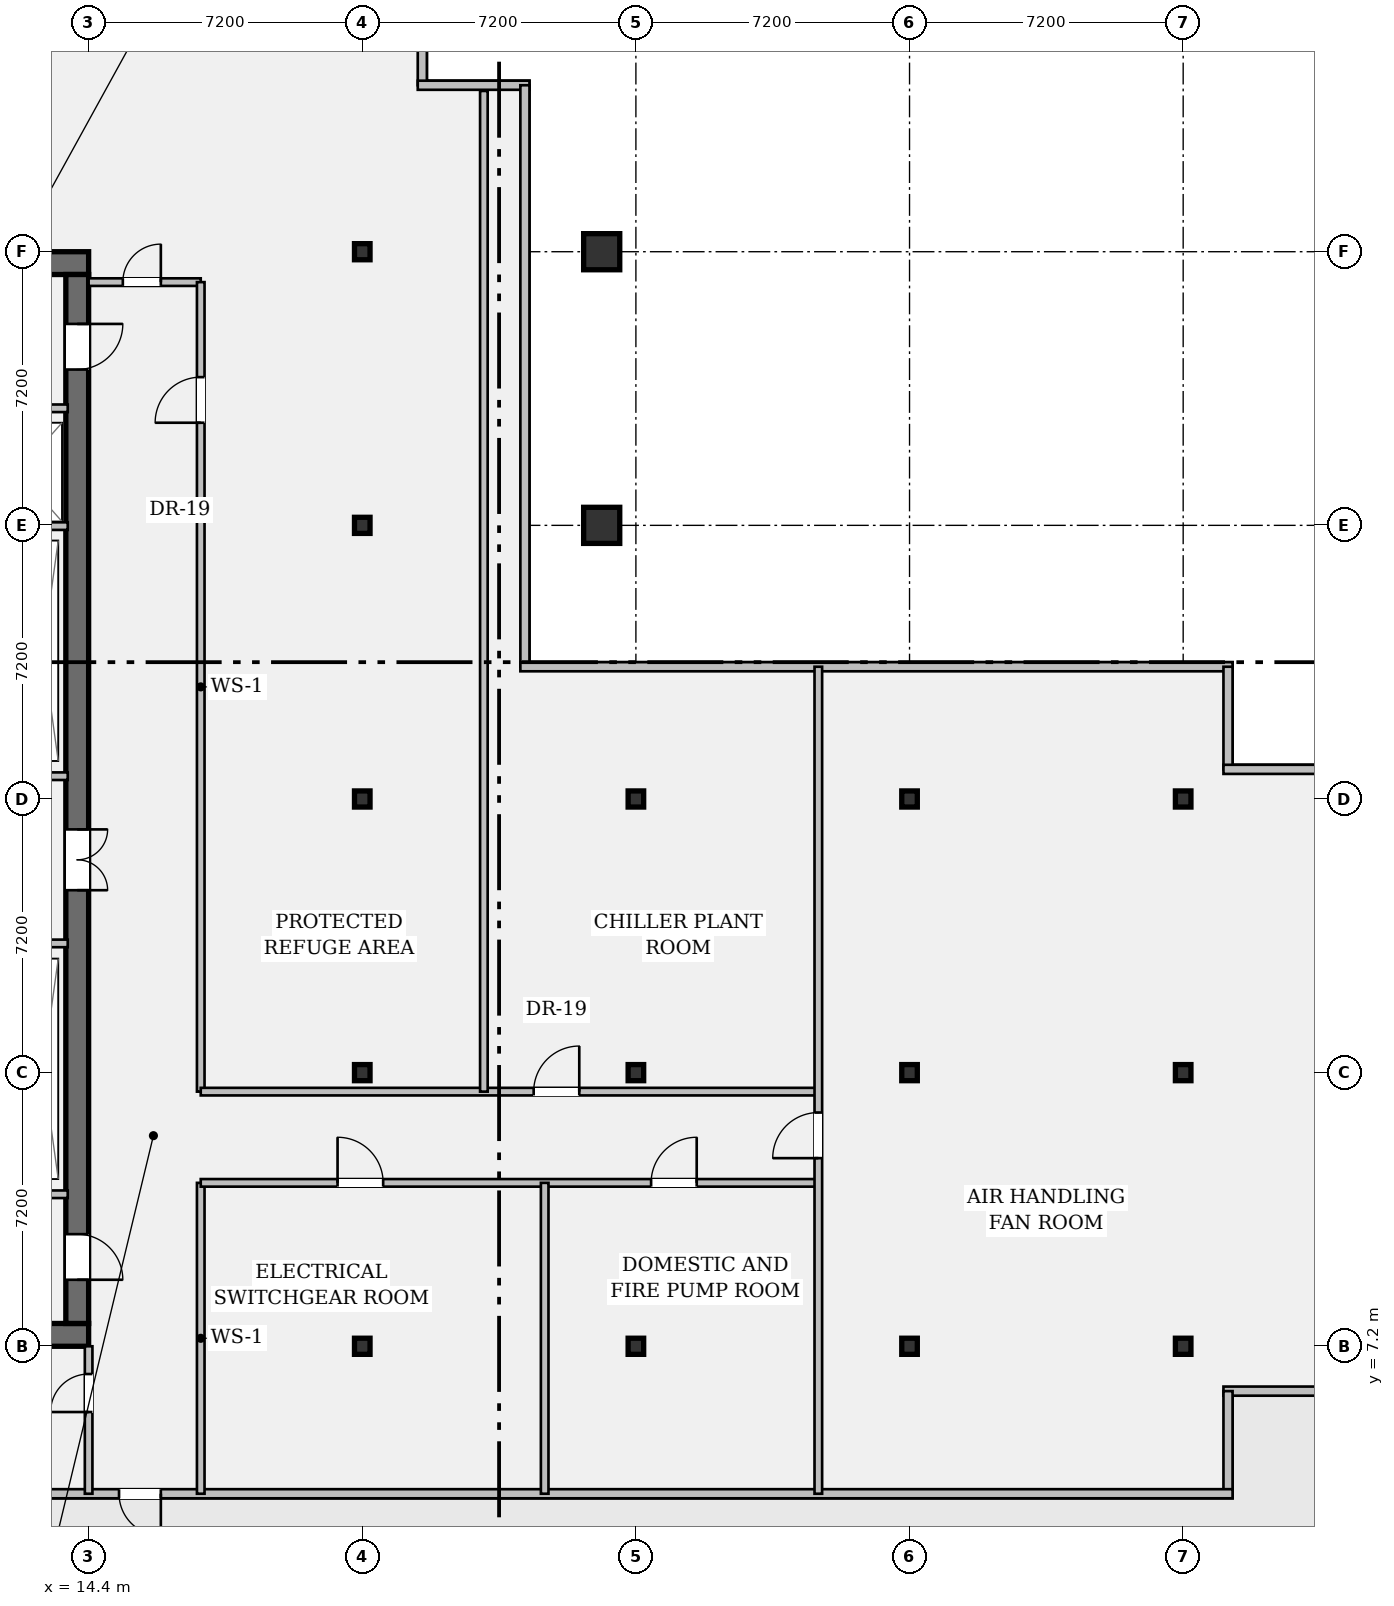
"""IFC4 building model, lengths in metres.
Left out: names, types, materials, properties, quantities, classifications, styles, units other than length and angle.
Written with IfcOpenShell. Run it as: python <this file> out.ifc"""

import sys

from ifc_helpers import new_model, si_unit, direction, frame, frame_2d, origin, origin_2d, place, context, subcontext, project, spatial, rectangle, hollow_rectangle, i_section, extrude, element, fill, save


model = new_model("IFC4")
c1 = context("Model", 3, precision=1e-05, world=origin(), true_north=direction((0.0, 1.0)))
c2 = subcontext(c1, "Body", "Model", "MODEL_VIEW")
j1 = project(units=[si_unit("LENGTHUNIT", "METRE"), si_unit("PLANEANGLEUNIT", "RADIAN")], contexts=[c1])
p1 = place(None, origin())
s1 = spatial("IfcSite", under=j1, at=p1, CompositionType="ELEMENT")
p2 = place(p1, origin())
s2 = spatial("IfcBuilding", under=s1, at=p2, CompositionType="ELEMENT")
p3 = place(p2, frame((0.0, 0.0, 92.75)))
s3 = spatial("IfcBuildingStorey", under=s2, at=p3, CompositionType="ELEMENT", Elevation=92.75)
for number, where, z_axis, x_axis in (
    (1, (0.6, 7.5, 0.0), (0.0, 0.0, 1.0), (1.0, 0.0, 0.0)),
    (2, (0.6, 35.7, 0.0), (0.0, 0.0, 1.0), (1.0, 0.0, 0.0)),
):
    element("IfcWall", number, at=place(p3, frame(where, z_axis=z_axis, x_axis=x_axis)), inside=s3, PredefinedType="SHEAR", context=c2, shape_type="SweptSolid", body=[
        extrude(rectangle(XDim=13.8, YDim=0.6, at=frame_2d((6.9, 0.0))), origin(), (0.0, 0.0, 1.0), 4.6),
    ])
p4 = place(p3, frame((14.1, 35.4, 0.0), z_axis=(0.0, 0.0, 1.0), x_axis=(0.0, -1.0, 0.0)))
e3 = element("IfcWall", 3, at=p4, inside=s3, PredefinedType="SHEAR", context=c2, shape_type="SweptSolid", body=[
    extrude(rectangle(XDim=27.6, YDim=0.6, at=frame_2d((13.8, 0.0))), origin(), (0.0, 0.0, 1.0), 4.6),
])
p5 = place(p4, frame((1.3, 0.0, 0.0)))
e4 = element("IfcOpeningElement", 4, at=p5, cuts=e3, PredefinedType="OPENING", context=c2, shape_type="SweptSolid", body=[
    extrude(rectangle(XDim=1.2, YDim=2.15, at=frame_2d((0.6, 1.075))), frame((0.0, 0.312, 0.0), z_axis=(0.0, -1.0, 0.0), x_axis=(1.0, 0.0, 0.0)), (0.0, 0.0, 1.0), 0.624),
])
p6 = place(p4, frame((25.25, 0.0, 0.0)))
e5 = element("IfcOpeningElement", 5, at=p6, cuts=e3, PredefinedType="OPENING", context=c2, shape_type="SweptSolid", body=[
    extrude(rectangle(XDim=1.2, YDim=2.15, at=frame_2d((0.6, 1.075))), frame((0.0, 0.312, 0.0), z_axis=(0.0, -1.0, 0.0), x_axis=(1.0, 0.0, 0.0)), (0.0, 0.0, 1.0), 0.624),
])
p7 = place(p4, frame((14.6, 0.0, 0.0)))
e6 = element("IfcOpeningElement", 6, at=p7, cuts=e3, PredefinedType="OPENING", context=c2, shape_type="SweptSolid", body=[
    extrude(rectangle(XDim=1.6, YDim=2.2, at=frame_2d((0.8, 1.1))), frame((0.0, 0.312, 0.0), z_axis=(0.0, -1.0, 0.0), x_axis=(1.0, 0.0, 0.0)), (0.0, 0.0, 1.0), 0.624),
])
for number, where, z_axis, x_axis in (
    (7, (21.6, 7.2, 0.0), (0.0, 0.0, 1.0), (1.0, 0.0, 0.0)),
    (8, (21.6, 14.4, 0.0), (0.0, 0.0, 1.0), (1.0, 0.0, 0.0)),
    (9, (21.6, 21.6, 0.0), (0.0, 0.0, 1.0), (1.0, 0.0, 0.0)),
    (10, (21.6, 28.8, 0.0), (0.0, 0.0, 1.0), (1.0, 0.0, 0.0)),
    (11, (21.6, 36.0, 0.0), (0.0, 0.0, 1.0), (1.0, 0.0, 0.0)),
):
    element("IfcColumn", number, at=place(p3, frame(where, z_axis=z_axis, x_axis=x_axis)), inside=s3, PredefinedType="COLUMN", context=c2, shape_type="SweptSolid", body=[
        extrude(i_section(OverallWidth=0.409, OverallDepth=0.424, WebThickness=0.033, FlangeThickness=0.052, FilletRadius=0.018, at=origin_2d()), origin(), (0.0, 0.0, 1.0), 4.6),
    ])
for number, where, z_axis, x_axis in (
    (12, (27.9, 28.8, 0.0), (0.0, 0.0, 1.0), (1.0, 0.0, 0.0)),
    (13, (27.9, 36.0, 0.0), (0.0, 0.0, 1.0), (1.0, 0.0, 0.0)),
):
    element("IfcColumn", number, at=place(p3, frame(where, z_axis=z_axis, x_axis=x_axis)), inside=s3, PredefinedType="COLUMN", context=c2, shape_type="SweptSolid", body=[
        extrude(hollow_rectangle(XDim=0.95, YDim=0.95, WallThickness=0.06, at=origin_2d()), origin(), (0.0, 0.0, 1.0), 4.6),
    ])
for number, where, z_axis, x_axis in (
    (14, (28.8, 7.2, 0.0), (0.0, 0.0, 1.0), (1.0, 0.0, 0.0)),
    (15, (28.8, 14.4, 0.0), (0.0, 0.0, 1.0), (1.0, 0.0, 0.0)),
    (16, (28.8, 21.6, 0.0), (0.0, 0.0, 1.0), (1.0, 0.0, 0.0)),
    (17, (36.0, 7.2, 0.0), (0.0, 0.0, 1.0), (1.0, 0.0, 0.0)),
    (18, (36.0, 14.4, 0.0), (0.0, 0.0, 1.0), (1.0, 0.0, 0.0)),
    (19, (36.0, 21.6, 0.0), (0.0, 0.0, 1.0), (1.0, 0.0, 0.0)),
    (20, (43.2, 7.2, 0.0), (0.0, 0.0, 1.0), (1.0, 0.0, 0.0)),
    (21, (43.2, 14.4, 0.0), (0.0, 0.0, 1.0), (1.0, 0.0, 0.0)),
    (22, (43.2, 21.6, 0.0), (0.0, 0.0, 1.0), (1.0, 0.0, 0.0)),
):
    element("IfcColumn", number, at=place(p3, frame(where, z_axis=z_axis, x_axis=x_axis)), inside=s3, PredefinedType="COLUMN", context=c2, shape_type="SweptSolid", body=[
        extrude(i_section(OverallWidth=0.409, OverallDepth=0.424, WebThickness=0.033, FlangeThickness=0.052, FilletRadius=0.018, at=origin_2d()), origin(), (0.0, 0.0, 1.0), 4.6),
    ])
p8 = place(p3, frame((23.18, 43.08, 0.0), z_axis=(0.0, 0.0, 1.0), x_axis=(0.0, -1.0, 0.0)))
e23 = element("IfcWall", 23, at=p8, inside=s3, PredefinedType="STANDARD", context=c2, shape_type="SweptSolid", body=[
    extrude(rectangle(XDim=2.7, YDim=0.24, at=frame_2d((1.35, 0.0))), origin(), (0.0, 0.0, 1.0), 4.6),
])
p9 = place(p3, frame((23.06, 40.38, 0.0), z_axis=(0.0, 0.0, 1.0), x_axis=(1.0, 0.0, 0.0)))
e24 = element("IfcWall", 24, at=p9, inside=s3, PredefinedType="STANDARD", context=c2, shape_type="SweptSolid", body=[
    extrude(rectangle(XDim=2.94, YDim=0.24, at=frame_2d((1.47, 0.0))), origin(), (0.0, 0.0, 1.0), 4.6),
])
p10 = place(p3, frame((25.88, 40.38, 0.0), z_axis=(0.0, 0.0, 1.0), x_axis=(0.0, -1.0, 0.0)))
e25 = element("IfcWall", 25, at=p10, inside=s3, PredefinedType="STANDARD", context=c2, shape_type="SweptSolid", body=[
    extrude(rectangle(XDim=15.3, YDim=0.24, at=frame_2d((7.65, 0.0))), origin(), (0.0, 0.0, 1.0), 3.185),
])
p11 = place(p3, frame((25.76, 25.08, 0.0), z_axis=(0.0, 0.0, 1.0), x_axis=(1.0, 0.0, 0.0)))
e26 = element("IfcWall", 26, at=p11, inside=s3, PredefinedType="STANDARD", context=c2, shape_type="SweptSolid", body=[
    extrude(rectangle(XDim=18.74, YDim=0.24, at=frame_2d((9.37, 0.0))), origin(), (0.0, 0.0, 1.0), 4.6),
])
p12 = place(p3, frame((44.38, 25.08, 0.0), z_axis=(0.0, 0.0, 1.0), x_axis=(0.0, -1.0, 0.0)))
e27 = element("IfcWall", 27, at=p12, inside=s3, PredefinedType="STANDARD", context=c2, shape_type="SweptSolid", body=[
    extrude(rectangle(XDim=2.7, YDim=0.24, at=frame_2d((1.35, 0.0))), origin(), (0.0, 0.0, 1.0), 4.6),
])
for number, where, z_axis, x_axis in (
    (28, (44.26, 22.38, 0.0), (0.0, 0.0, 1.0), (1.0, 0.0, 0.0)),
    (29, (47.2, 6.02, 0.0), (0.0, 0.0, 1.0), (-1.0, 0.0, 0.0)),
):
    element("IfcWall", number, at=place(p3, frame(where, z_axis=z_axis, x_axis=x_axis)), inside=s3, PredefinedType="STANDARD", context=c2, shape_type="SweptSolid", body=[
        extrude(rectangle(XDim=2.94, YDim=0.24, at=frame_2d((1.47, 0.0))), origin(), (0.0, 0.0, 1.0), 4.6),
    ])
p13 = place(p3, frame((44.38, 6.02, 0.0), z_axis=(0.0, 0.0, 1.0), x_axis=(0.0, -1.0, 0.0)))
e30 = element("IfcWall", 30, at=p13, inside=s3, PredefinedType="STANDARD", context=c2, shape_type="SweptSolid", body=[
    extrude(rectangle(XDim=2.7, YDim=0.24, at=frame_2d((1.35, 0.0))), origin(), (0.0, 0.0, 1.0), 4.6),
])
p14 = place(p3, frame((44.5, 3.32, 0.0), z_axis=(0.0, 0.0, 1.0), x_axis=(-1.0, 0.0, 0.0)))
e31 = element("IfcWall", 31, at=p14, inside=s3, PredefinedType="STANDARD", context=c2, shape_type="SweptSolid", body=[
    extrude(rectangle(XDim=41.8, YDim=0.24, at=frame_2d((20.9, 0.0))), origin(), (0.0, 0.0, 1.0), 3.185),
])
p15 = place(p14, frame((28.2, 0.0, 0.0)))
e32 = element("IfcOpeningElement", 32, at=p15, cuts=e31, PredefinedType="OPENING", context=c2, shape_type="SweptSolid", body=[
    extrude(rectangle(XDim=1.1, YDim=2.15, at=frame_2d((0.55, 1.075))), frame((0.0, 0.132, 0.0), z_axis=(0.0, -1.0, 0.0), x_axis=(1.0, 0.0, 0.0)), (0.0, 0.0, 1.0), 0.264),
])
p16 = place(p3, frame((8.7, 31.88, 0.0), z_axis=(0.0, 0.0, 1.0), x_axis=(1.0, 0.0, 0.0)))
e33 = element("IfcWall", 33, at=p16, inside=s3, PredefinedType="PARTITIONING", context=c2, shape_type="SweptSolid", body=[
    extrude(rectangle(XDim=5.15, YDim=0.2, at=frame_2d((2.575, 0.0))), origin(), (0.0, 0.0, 1.0), 4.6),
])
p17 = place(p16, frame((0.75, 0.0, 0.0)))
e34 = element("IfcOpeningElement", 34, at=p17, cuts=e33, PredefinedType="OPENING", context=c2, shape_type="SweptSolid", body=[
    extrude(rectangle(XDim=1.2, YDim=2.2, at=frame_2d((0.6, 1.1))), frame((0.0, 0.112, 0.0), z_axis=(0.0, -1.0, 0.0), x_axis=(1.0, 0.0, 0.0)), (0.0, 0.0, 1.0), 0.224),
])
p18 = place(p16, frame((3.25, 0.0, 0.0)))
e35 = element("IfcOpeningElement", 35, at=p18, cuts=e33, PredefinedType="OPENING", context=c2, shape_type="SweptSolid", body=[
    extrude(rectangle(XDim=1.2, YDim=2.2, at=frame_2d((0.6, 1.1))), frame((0.0, 0.112, 0.0), z_axis=(0.0, -1.0, 0.0), x_axis=(1.0, 0.0, 0.0)), (0.0, 0.0, 1.0), 0.224),
])
for number, where, z_axis, x_axis in (
    (36, (8.7, 11.2, 0.0), (0.0, 0.0, 1.0), (1.0, 0.0, 0.0)),
    (37, (8.7, 28.78, 0.0), (0.0, 0.0, 1.0), (1.0, 0.0, 0.0)),
):
    element("IfcWall", number, at=place(p3, frame(where, z_axis=z_axis, x_axis=x_axis)), inside=s3, PredefinedType="PARTITIONING", context=c2, shape_type="SweptSolid", body=[
        extrude(rectangle(XDim=5.15, YDim=0.2, at=frame_2d((2.575, 0.0))), origin(), (0.0, 0.0, 1.0), 4.6),
    ])
for number, where, z_axis, x_axis in (
    (38, (7.1, 22.2, 0.0), (0.0, 0.0, 1.0), (1.0, 0.0, 0.0)),
    (39, (7.1, 17.8, 0.0), (0.0, 0.0, 1.0), (1.0, 0.0, 0.0)),
):
    element("IfcWall", number, at=place(p3, frame(where, z_axis=z_axis, x_axis=x_axis)), inside=s3, PredefinedType="PARTITIONING", context=c2, shape_type="SweptSolid", body=[
        extrude(rectangle(XDim=6.75, YDim=0.2, at=frame_2d((3.375, 0.0))), origin(), (0.0, 0.0, 1.0), 4.6),
    ])
p19 = place(p3, frame((14.4, 3.32, 0.0), z_axis=(0.0, 0.0, 1.0), x_axis=(0.0, 1.0, 0.0)))
e40 = element("IfcWall", 40, at=p19, inside=s3, PredefinedType="PARTITIONING", context=c2, shape_type="SweptSolid", body=[
    extrude(rectangle(XDim=3.88, YDim=0.2, at=frame_2d((1.94, 0.0))), origin(), (0.0, 0.0, 1.0), 3.467),
])
p20 = place(p19, frame((2.15, 0.0, 0.0)))
e41 = element("IfcOpeningElement", 41, at=p20, cuts=e40, PredefinedType="OPENING", context=c2, shape_type="SweptSolid", body=[
    extrude(rectangle(XDim=1.0, YDim=2.15, at=frame_2d((0.5, 1.075))), frame((0.0, 0.112, 0.0), z_axis=(0.0, -1.0, 0.0), x_axis=(1.0, 0.0, 0.0)), (0.0, 0.0, 1.0), 0.224),
])
p21 = place(p3, frame((14.4, 35.2, 0.0), z_axis=(0.0, 0.0, 1.0), x_axis=(1.0, 0.0, 0.0)))
e42 = element("IfcWall", 42, at=p21, inside=s3, PredefinedType="PARTITIONING", context=c2, shape_type="SweptSolid", body=[
    extrude(rectangle(XDim=2.95, YDim=0.2, at=frame_2d((1.475, 0.0))), origin(), (0.0, 0.0, 1.0), 3.813),
])
p22 = place(p21, frame((0.9, 0.0, 0.0)))
e43 = element("IfcOpeningElement", 43, at=p22, cuts=e42, PredefinedType="OPENING", context=c2, shape_type="SweptSolid", body=[
    extrude(rectangle(XDim=1.0, YDim=2.15, at=frame_2d((0.5, 1.075))), frame((0.0, 0.112, 0.0), z_axis=(0.0, -1.0, 0.0), x_axis=(1.0, 0.0, 0.0)), (0.0, 0.0, 1.0), 0.224),
])
p23 = place(p3, frame((17.35, 3.32, 0.0), z_axis=(0.0, 0.0, 1.0), x_axis=(0.0, 1.0, 0.0)))
e44 = element("IfcWall", 44, at=p23, inside=s3, PredefinedType="PARTITIONING", context=c2, shape_type="SweptSolid", body=[
    extrude(rectangle(XDim=8.18, YDim=0.2, at=frame_2d((4.09, 0.0))), origin(), (0.0, 0.0, 1.0), 3.813),
])
p24 = place(p3, frame((17.35, 13.9, 0.0), z_axis=(0.0, 0.0, 1.0), x_axis=(0.0, 1.0, 0.0)))
e45 = element("IfcWall", 45, at=p24, inside=s3, PredefinedType="PARTITIONING", context=c2, shape_type="SweptSolid", body=[
    extrude(rectangle(XDim=21.3, YDim=0.2, at=frame_2d((10.65, 0.0))), origin(), (0.0, 0.0, 1.0), 3.813),
])
p25 = place(p24, frame((17.6, 0.0, 0.0)))
e46 = element("IfcOpeningElement", 46, at=p25, cuts=e45, PredefinedType="OPENING", context=c2, shape_type="SweptSolid", body=[
    extrude(rectangle(XDim=1.2, YDim=2.15, at=frame_2d((0.6, 1.075))), frame((0.0, 0.112, 0.0), z_axis=(0.0, -1.0, 0.0), x_axis=(1.0, 0.0, 0.0)), (0.0, 0.0, 1.0), 0.224),
])
p26 = place(p3, frame((17.35, 11.5, 0.0), z_axis=(0.0, 0.0, 1.0), x_axis=(1.0, 0.0, 0.0)))
e47 = element("IfcWall", 47, at=p26, inside=s3, PredefinedType="PARTITIONING", context=c2, shape_type="SweptSolid", body=[
    extrude(rectangle(XDim=16.25, YDim=0.2, at=frame_2d((8.125, 0.0))), origin(), (0.0, 0.0, 1.0), 3.813),
])
p27 = place(p26, frame((3.6, 0.0, 0.0)))
e48 = element("IfcOpeningElement", 48, at=p27, cuts=e47, PredefinedType="OPENING", context=c2, shape_type="SweptSolid", body=[
    extrude(rectangle(XDim=1.2, YDim=2.15, at=frame_2d((0.6, 1.075))), frame((0.0, 0.112, 0.0), z_axis=(0.0, -1.0, 0.0), x_axis=(1.0, 0.0, 0.0)), (0.0, 0.0, 1.0), 0.224),
])
p28 = place(p26, frame((11.85, 0.0, 0.0)))
e49 = element("IfcOpeningElement", 49, at=p28, cuts=e47, PredefinedType="OPENING", context=c2, shape_type="SweptSolid", body=[
    extrude(rectangle(XDim=1.2, YDim=2.15, at=frame_2d((0.6, 1.075))), frame((0.0, 0.112, 0.0), z_axis=(0.0, -1.0, 0.0), x_axis=(1.0, 0.0, 0.0)), (0.0, 0.0, 1.0), 0.224),
])
p29 = place(p3, frame((17.35, 13.9, 0.0), z_axis=(0.0, 0.0, 1.0), x_axis=(1.0, 0.0, 0.0)))
e50 = element("IfcWall", 50, at=p29, inside=s3, PredefinedType="PARTITIONING", context=c2, shape_type="SweptSolid", body=[
    extrude(rectangle(XDim=16.25, YDim=0.2, at=frame_2d((8.125, 0.0))), origin(), (0.0, 0.0, 1.0), 3.813),
])
p30 = place(p29, frame((8.76, 0.0, 0.0)))
e51 = element("IfcOpeningElement", 51, at=p30, cuts=e50, PredefinedType="OPENING", context=c2, shape_type="SweptSolid", body=[
    extrude(rectangle(XDim=1.2, YDim=2.15, at=frame_2d((0.6, 1.075))), frame((0.0, 0.112, 0.0), z_axis=(0.0, -1.0, 0.0), x_axis=(1.0, 0.0, 0.0)), (0.0, 0.0, 1.0), 0.224),
])
p31 = place(p3, frame((33.6, 3.32, 0.0), z_axis=(0.0, 0.0, 1.0), x_axis=(0.0, 1.0, 0.0)))
e52 = element("IfcWall", 52, at=p31, inside=s3, PredefinedType="PARTITIONING", context=c2, shape_type="SweptSolid", body=[
    extrude(rectangle(XDim=21.76, YDim=0.2, at=frame_2d((10.88, 0.0))), origin(), (0.0, 0.0, 1.0), 3.813),
])
p32 = place(p31, frame((8.83, 0.0, 0.0)))
e53 = element("IfcOpeningElement", 53, at=p32, cuts=e52, PredefinedType="OPENING", context=c2, shape_type="SweptSolid", body=[
    extrude(rectangle(XDim=1.2, YDim=2.15, at=frame_2d((0.6, 1.075))), frame((0.0, 0.112, 0.0), z_axis=(0.0, -1.0, 0.0), x_axis=(1.0, 0.0, 0.0)), (0.0, 0.0, 1.0), 0.224),
])
p33 = place(p3, frame((26.4, 3.32, 0.0), z_axis=(0.0, 0.0, 1.0), x_axis=(0.0, 1.0, 0.0)))
e54 = element("IfcWall", 54, at=p33, inside=s3, PredefinedType="PARTITIONING", context=c2, shape_type="SweptSolid", body=[
    extrude(rectangle(XDim=8.18, YDim=0.2, at=frame_2d((4.09, 0.0))), origin(), (0.0, 0.0, 1.0), 3.813),
])
p34 = place(p3, frame((24.8, 13.9, 0.0), z_axis=(0.0, 0.0, 1.0), x_axis=(0.0, 1.0, 0.0)))
e55 = element("IfcWall", 55, at=p34, inside=s3, PredefinedType="PARTITIONING", context=c2, shape_type="SweptSolid", body=[
    extrude(rectangle(XDim=26.33, YDim=0.2, at=frame_2d((13.165, 0.0))), origin(), (0.0, 0.0, 1.0), 3.185),
])
p35 = place(p15, origin())
e56 = element("IfcDoor", 56, at=p35, inside=s3, OperationType="SINGLE_SWING_LEFT", PredefinedType="DOOR", context=c2, shape_type="SweptSolid", body=[
    extrude(rectangle(XDim=1.1, YDim=2.15, at=frame_2d((0.55, 1.075))), frame((0.0, 0.025, 0.0), z_axis=(0.0, -1.0, 0.0), x_axis=(1.0, 0.0, 0.0)), (0.0, 0.0, 1.0), 0.05),
])
fill(e32, e56)
p36 = place(p5, origin())
e57 = element("IfcDoor", 57, at=p36, inside=s3, OperationType="SINGLE_SWING_LEFT", PredefinedType="DOOR", context=c2, shape_type="SweptSolid", body=[
    extrude(rectangle(XDim=1.2, YDim=2.15, at=frame_2d((0.6, 1.075))), frame((0.0, 0.025, 0.0), z_axis=(0.0, -1.0, 0.0), x_axis=(1.0, 0.0, 0.0)), (0.0, 0.0, 1.0), 0.05),
])
fill(e4, e57)
p37 = place(p6, origin())
e58 = element("IfcDoor", 58, at=p37, inside=s3, OperationType="SINGLE_SWING_RIGHT", PredefinedType="DOOR", context=c2, shape_type="SweptSolid", body=[
    extrude(rectangle(XDim=1.2, YDim=2.15, at=frame_2d((0.6, 1.075))), frame((0.0, 0.025, 0.0), z_axis=(0.0, -1.0, 0.0), x_axis=(1.0, 0.0, 0.0)), (0.0, 0.0, 1.0), 0.05),
])
fill(e5, e58)
p38 = place(p7, origin())
e59 = element("IfcDoor", 59, at=p38, inside=s3, OperationType="DOUBLE_DOOR_SINGLE_SWING", PredefinedType="DOOR", context=c2, shape_type="SweptSolid", body=[
    extrude(rectangle(XDim=1.6, YDim=2.2, at=frame_2d((0.8, 1.1))), frame((0.0, 0.025, 0.0), z_axis=(0.0, -1.0, 0.0), x_axis=(1.0, 0.0, 0.0)), (0.0, 0.0, 1.0), 0.05),
])
fill(e6, e59)
p39 = place(p25, origin())
e60 = element("IfcDoor", 60, at=p39, inside=s3, OperationType="SINGLE_SWING_LEFT", PredefinedType="DOOR", context=c2, shape_type="SweptSolid", body=[
    extrude(rectangle(XDim=1.2, YDim=2.15, at=frame_2d((0.6, 1.075))), frame((0.0, 0.025, 0.0), z_axis=(0.0, -1.0, 0.0), x_axis=(1.0, 0.0, 0.0)), (0.0, 0.0, 1.0), 0.05),
])
fill(e46, e60)
p40 = place(p30, origin())
e61 = element("IfcDoor", 61, at=p40, inside=s3, OperationType="SINGLE_SWING_RIGHT", PredefinedType="DOOR", context=c2, shape_type="SweptSolid", body=[
    extrude(rectangle(XDim=1.2, YDim=2.15, at=frame_2d((0.6, 1.075))), frame((0.0, 0.025, 0.0), z_axis=(0.0, -1.0, 0.0), x_axis=(1.0, 0.0, 0.0)), (0.0, 0.0, 1.0), 0.05),
])
fill(e51, e61)
p41 = place(p27, origin())
e62 = element("IfcDoor", 62, at=p41, inside=s3, OperationType="SINGLE_SWING_LEFT", PredefinedType="DOOR", context=c2, shape_type="SweptSolid", body=[
    extrude(rectangle(XDim=1.2, YDim=2.15, at=frame_2d((0.6, 1.075))), frame((0.0, 0.025, 0.0), z_axis=(0.0, -1.0, 0.0), x_axis=(1.0, 0.0, 0.0)), (0.0, 0.0, 1.0), 0.05),
])
fill(e48, e62)
p42 = place(p28, origin())
e63 = element("IfcDoor", 63, at=p42, inside=s3, OperationType="SINGLE_SWING_RIGHT", PredefinedType="DOOR", context=c2, shape_type="SweptSolid", body=[
    extrude(rectangle(XDim=1.2, YDim=2.15, at=frame_2d((0.6, 1.075))), frame((0.0, 0.025, 0.0), z_axis=(0.0, -1.0, 0.0), x_axis=(1.0, 0.0, 0.0)), (0.0, 0.0, 1.0), 0.05),
])
fill(e49, e63)
p43 = place(p32, origin())
e64 = element("IfcDoor", 64, at=p43, inside=s3, OperationType="SINGLE_SWING_LEFT", PredefinedType="DOOR", context=c2, shape_type="SweptSolid", body=[
    extrude(rectangle(XDim=1.2, YDim=2.15, at=frame_2d((0.6, 1.075))), frame((0.0, 0.025, 0.0), z_axis=(0.0, -1.0, 0.0), x_axis=(1.0, 0.0, 0.0)), (0.0, 0.0, 1.0), 0.05),
])
fill(e53, e64)
p44 = place(p22, origin())
e65 = element("IfcDoor", 65, at=p44, inside=s3, OperationType="SINGLE_SWING_RIGHT", PredefinedType="DOOR", context=c2, shape_type="SweptSolid", body=[
    extrude(rectangle(XDim=1.0, YDim=2.15, at=frame_2d((0.5, 1.075))), frame((0.0, 0.025, 0.0), z_axis=(0.0, -1.0, 0.0), x_axis=(1.0, 0.0, 0.0)), (0.0, 0.0, 1.0), 0.05),
])
fill(e43, e65)
p45 = place(p20, origin())
e66 = element("IfcDoor", 66, at=p45, inside=s3, OperationType="SINGLE_SWING_LEFT", PredefinedType="DOOR", context=c2, shape_type="SweptSolid", body=[
    extrude(rectangle(XDim=1.0, YDim=2.15, at=frame_2d((0.5, 1.075))), frame((0.0, 0.025, 0.0), z_axis=(0.0, -1.0, 0.0), x_axis=(1.0, 0.0, 0.0)), (0.0, 0.0, 1.0), 0.05),
])
fill(e41, e66)
save(model, sys.argv[1])
